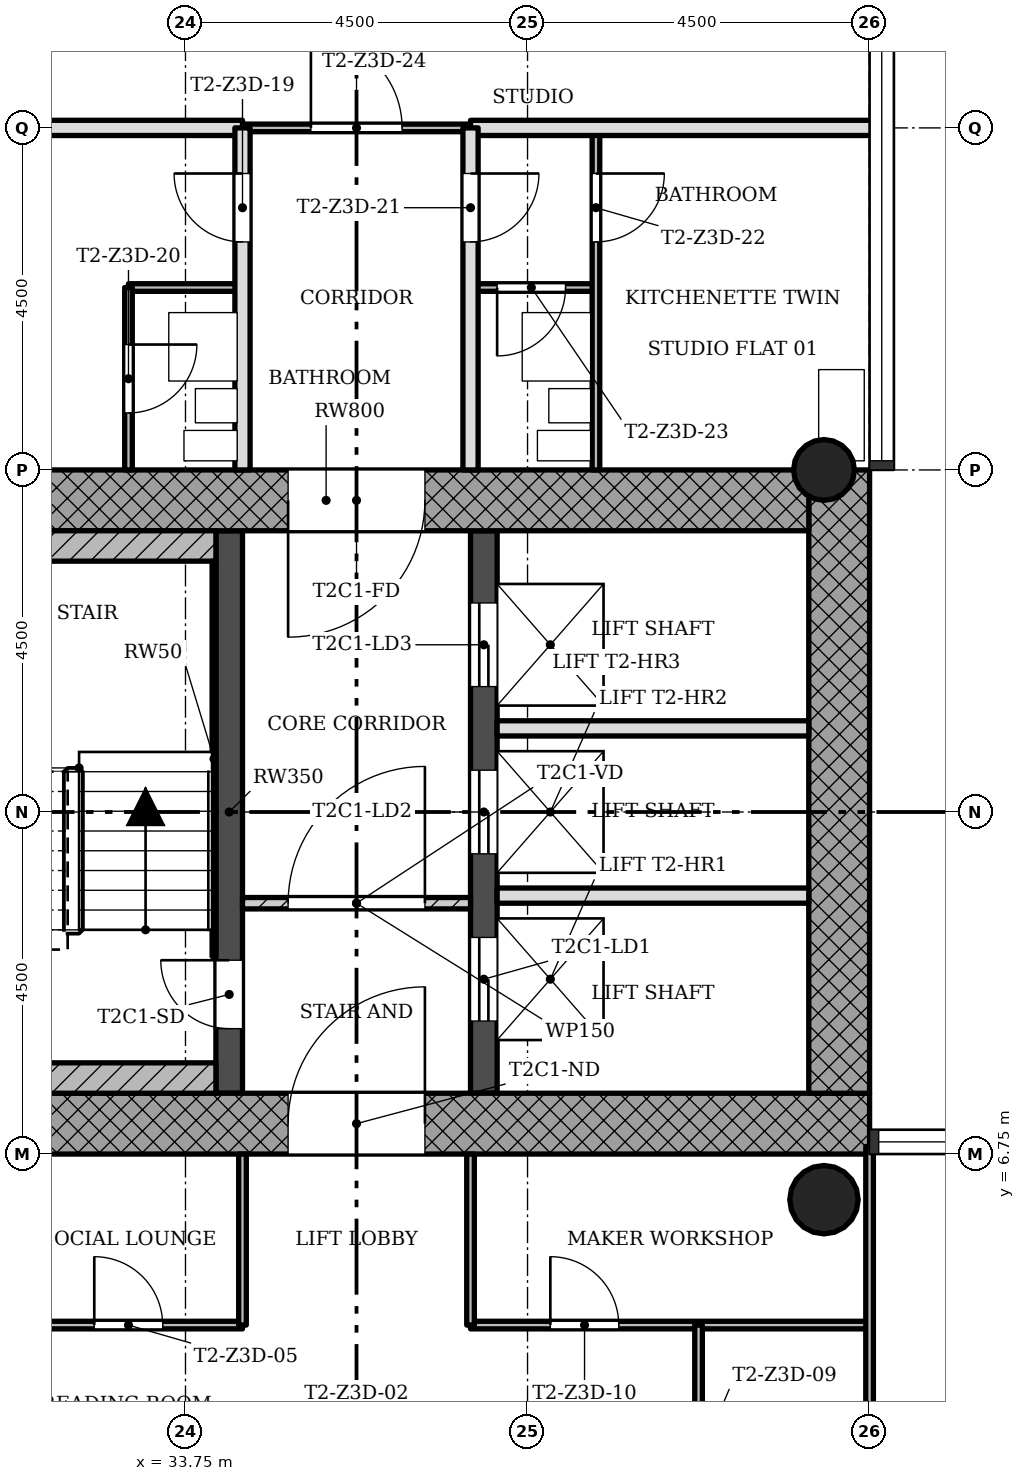
"""IFC4 building model, lengths in metres.
Left out: names, types, materials, properties, quantities, classifications, styles, units other than length and angle.
Written with IfcOpenShell. Run it as: python <this file> out.ifc"""

import sys

from ifc_helpers import new_model, si_unit, direction, frame, frame_2d, origin, origin_2d, place, context, subcontext, project, spatial, rectangle, hollow_circle, extrude, element, fill, save


model = new_model("IFC4")
c1 = context("Model", 3, precision=1e-05, world=origin(), true_north=direction((0.0, 1.0)))
c2 = subcontext(c1, "Body", "Model", "MODEL_VIEW")
j1 = project(units=[si_unit("LENGTHUNIT", "METRE"), si_unit("PLANEANGLEUNIT", "RADIAN")], contexts=[c1])
p1 = place(None, origin())
s1 = spatial("IfcSite", under=j1, at=p1, CompositionType="ELEMENT")
p2 = place(p1, origin())
s2 = spatial("IfcBuilding", under=s1, at=p2, CompositionType="ELEMENT")
p3 = place(p2, frame((0.0, 0.0, 174.5)))
s3 = spatial("IfcBuildingStorey", under=s2, at=p3, CompositionType="ELEMENT", Elevation=174.5)
p4 = place(p3, frame((30.05, 7.15, 0.0), z_axis=(0.0, 0.0, 1.0), x_axis=(1.0, 0.0, 0.0)))
e1 = element("IfcWall", 1, at=p4, inside=s3, PredefinedType="SHEAR", context=c2, shape_type="SweptSolid", body=[
    extrude(rectangle(XDim=12.7, YDim=0.8, at=frame_2d((6.35, 0.0))), origin(), (0.0, 0.0, 1.0), 3.4),
])
p5 = place(p4, frame((5.05, 0.0, 0.0)))
e2 = element("IfcOpeningElement", 2, at=p5, cuts=e1, PredefinedType="OPENING", context=c2, shape_type="SweptSolid", body=[
    extrude(rectangle(XDim=1.8, YDim=2.1, at=frame_2d((0.9, 1.05))), frame((0.0, 0.41, 0.0), z_axis=(0.0, -1.0, 0.0), x_axis=(1.0, 0.0, 0.0)), (0.0, 0.0, 1.0), 0.82),
])
p6 = place(p3, frame((42.35, 7.55, 0.0), z_axis=(0.0, 0.0, 1.0), x_axis=(0.0, 1.0, 0.0)))
e3 = element("IfcWall", 3, at=p6, inside=s3, PredefinedType="SHEAR", context=c2, shape_type="SweptSolid", body=[
    extrude(rectangle(XDim=8.2, YDim=0.8, at=frame_2d((4.1, 0.0))), origin(), (0.0, 0.0, 1.0), 3.4),
])
p7 = place(p3, frame((41.95, 15.35, 0.0), z_axis=(0.0, 0.0, 1.0), x_axis=(-1.0, 0.0, 0.0)))
e4 = element("IfcWall", 4, at=p7, inside=s3, PredefinedType="SHEAR", context=c2, shape_type="SweptSolid", body=[
    extrude(rectangle(XDim=12.7, YDim=0.8, at=frame_2d((6.35, 0.0))), origin(), (0.0, 0.0, 1.0), 3.4),
])
p8 = place(p7, frame((5.05, 0.0, 0.0)))
e5 = element("IfcOpeningElement", 5, at=p8, cuts=e4, PredefinedType="OPENING", context=c2, shape_type="SweptSolid", body=[
    extrude(rectangle(XDim=1.8, YDim=2.1, at=frame_2d((0.9, 1.05))), frame((0.0, 0.41, 0.0), z_axis=(0.0, -1.0, 0.0), x_axis=(1.0, 0.0, 0.0)), (0.0, 0.0, 1.0), 0.82),
])
p9 = place(p3, frame((34.325, 7.55, 0.0), z_axis=(0.0, 0.0, 1.0), x_axis=(0.0, 1.0, 0.0)))
e6 = element("IfcWall", 6, at=p9, inside=s3, PredefinedType="SHEAR", context=c2, shape_type="SweptSolid", body=[
    extrude(rectangle(XDim=7.4, YDim=0.35, at=frame_2d((3.7, 0.0))), origin(), (0.0, 0.0, 1.0), 3.4),
])
p10 = place(p9, frame((0.85, 0.0, 0.0)))
e7 = element("IfcOpeningElement", 7, at=p10, cuts=e6, PredefinedType="OPENING", context=c2, shape_type="SweptSolid", body=[
    extrude(rectangle(XDim=0.9, YDim=2.1, at=frame_2d((0.45, 1.05))), frame((0.0, 0.185, 0.0), z_axis=(0.0, -1.0, 0.0), x_axis=(1.0, 0.0, 0.0)), (0.0, 0.0, 1.0), 0.37),
])
p11 = place(p3, frame((37.675, 7.55, 0.0), z_axis=(0.0, 0.0, 1.0), x_axis=(0.0, 1.0, 0.0)))
e8 = element("IfcWall", 8, at=p11, inside=s3, PredefinedType="SHEAR", context=c2, shape_type="SweptSolid", body=[
    extrude(rectangle(XDim=7.4, YDim=0.35, at=frame_2d((3.7, 0.0))), origin(), (0.0, 0.0, 1.0), 3.4),
])
p12 = place(p11, frame((0.95, 0.0, 0.0)))
e9 = element("IfcOpeningElement", 9, at=p12, cuts=e8, PredefinedType="OPENING", context=c2, shape_type="SweptSolid", body=[
    extrude(rectangle(XDim=1.1, YDim=2.1, at=frame_2d((0.55, 1.05))), frame((0.0, 0.185, 0.0), z_axis=(0.0, -1.0, 0.0), x_axis=(1.0, 0.0, 0.0)), (0.0, 0.0, 1.0), 0.37),
])
p13 = place(p11, frame((3.15, 0.0, 0.0)))
e10 = element("IfcOpeningElement", 10, at=p13, cuts=e8, PredefinedType="OPENING", context=c2, shape_type="SweptSolid", body=[
    extrude(rectangle(XDim=1.1, YDim=2.1, at=frame_2d((0.55, 1.05))), frame((0.0, 0.185, 0.0), z_axis=(0.0, -1.0, 0.0), x_axis=(1.0, 0.0, 0.0)), (0.0, 0.0, 1.0), 0.37),
])
p14 = place(p11, frame((5.35, 0.0, 0.0)))
e11 = element("IfcOpeningElement", 11, at=p14, cuts=e8, PredefinedType="OPENING", context=c2, shape_type="SweptSolid", body=[
    extrude(rectangle(XDim=1.1, YDim=2.1, at=frame_2d((0.55, 1.05))), frame((0.0, 0.185, 0.0), z_axis=(0.0, -1.0, 0.0), x_axis=(1.0, 0.0, 0.0)), (0.0, 0.0, 1.0), 0.37),
])
p15 = place(p3, frame((42.15, 15.75, 0.0), z_axis=(0.0, 0.0, 1.0), x_axis=(1.0, 0.0, 0.0)))
e12 = element("IfcColumn", 12, at=p15, inside=s3, PredefinedType="COLUMN", context=c2, shape_type="SweptSolid", body=[
    extrude(hollow_circle(Radius=0.4, WallThickness=0.028, at=origin_2d()), origin(), (0.0, 0.0, 1.0), 3.4),
])
p16 = place(p3, frame((42.15, 6.15, 0.0), z_axis=(0.0, 0.0, 1.0), x_axis=(1.0, 0.0, 0.0)))
e13 = element("IfcColumn", 13, at=p16, inside=s3, PredefinedType="COLUMN", context=c2, shape_type="SweptSolid", body=[
    extrude(hollow_circle(Radius=0.45, WallThickness=0.032, at=origin_2d()), origin(), (0.0, 0.0, 1.0), 3.4),
])
p17 = place(p3, frame((37.5, 10.05, 0.0), z_axis=(0.0, 0.0, 1.0), x_axis=(-1.0, 0.0, 0.0)))
e14 = element("IfcWall", 14, at=p17, inside=s3, PredefinedType="PARTITIONING", context=c2, shape_type="SweptSolid", body=[
    extrude(rectangle(XDim=3.0, YDim=0.15, at=frame_2d((1.5, 0.0))), origin(), (0.0, 0.0, 1.0), 3.0),
])
p18 = place(p17, frame((0.6, 0.0, 0.0)))
e15 = element("IfcOpeningElement", 15, at=p18, cuts=e14, PredefinedType="OPENING", context=c2, shape_type="SweptSolid", body=[
    extrude(rectangle(XDim=1.8, YDim=2.1, at=frame_2d((0.9, 1.05))), frame((0.0, 0.085, 0.0), z_axis=(0.0, -1.0, 0.0), x_axis=(1.0, 0.0, 0.0)), (0.0, 0.0, 1.0), 0.17),
])
for number, where, z_axis, x_axis in (
    (16, (41.95, 10.15, 0.0), (0.0, 0.0, 1.0), (-1.0, 0.0, 0.0)),
    (17, (41.95, 12.35, 0.0), (0.0, 0.0, 1.0), (-1.0, 0.0, 0.0)),
):
    element("IfcWall", number, at=place(p3, frame(where, z_axis=z_axis, x_axis=x_axis)), inside=s3, PredefinedType="SOLIDWALL", context=c2, shape_type="SweptSolid", body=[
        extrude(rectangle(XDim=4.1, YDim=0.2, at=frame_2d((2.05, 0.0))), origin(), (0.0, 0.0, 1.0), 3.0),
    ])
p19 = place(p3, frame((42.75, 4.5, 0.0), z_axis=(0.0, 0.0, 1.0), x_axis=(-1.0, 0.0, 0.0)))
e18 = element("IfcWall", 18, at=p19, inside=s3, PredefinedType="PARTITIONING", context=c2, shape_type="SweptSolid", body=[
    extrude(rectangle(XDim=5.25, YDim=0.1, at=frame_2d((2.625, 0.0))), origin(), (0.0, 0.0, 1.0), 3.0),
])
p20 = place(p19, frame((3.3, 0.0, 0.0)))
e19 = element("IfcOpeningElement", 19, at=p20, cuts=e18, PredefinedType="OPENING", context=c2, shape_type="SweptSolid", body=[
    extrude(rectangle(XDim=0.9, YDim=2.1, at=frame_2d((0.45, 1.05))), frame((0.0, 0.06, 0.0), z_axis=(0.0, -1.0, 0.0), x_axis=(1.0, 0.0, 0.0)), (0.0, 0.0, 1.0), 0.12),
])
p21 = place(p3, frame((34.5, 4.5, 0.0), z_axis=(0.0, 0.0, 1.0), x_axis=(-1.0, 0.0, 0.0)))
e20 = element("IfcWall", 20, at=p21, inside=s3, PredefinedType="PARTITIONING", context=c2, shape_type="SweptSolid", body=[
    extrude(rectangle(XDim=3.0, YDim=0.1, at=frame_2d((1.5, 0.0))), origin(), (0.0, 0.0, 1.0), 3.0),
])
p22 = place(p21, frame((1.05, 0.0, 0.0)))
e21 = element("IfcOpeningElement", 21, at=p22, cuts=e20, PredefinedType="OPENING", context=c2, shape_type="SweptSolid", body=[
    extrude(rectangle(XDim=0.9, YDim=2.1, at=frame_2d((0.45, 1.05))), frame((0.0, 0.06, 0.0), z_axis=(0.0, -1.0, 0.0), x_axis=(1.0, 0.0, 0.0)), (0.0, 0.0, 1.0), 0.12),
])
p23 = place(p3, frame((39.15, 18.15, 0.0), z_axis=(0.0, 0.0, 1.0), x_axis=(-1.0, 0.0, 0.0)))
e22 = element("IfcWall", 22, at=p23, inside=s3, PredefinedType="PARTITIONING", context=c2, shape_type="SweptSolid", body=[
    extrude(rectangle(XDim=1.65, YDim=0.1, at=frame_2d((0.825, 0.0))), origin(), (0.0, 0.0, 1.0), 3.0),
])
p24 = place(p23, frame((0.4, 0.0, 0.0)))
e23 = element("IfcOpeningElement", 23, at=p24, cuts=e22, PredefinedType="OPENING", context=c2, shape_type="SweptSolid", body=[
    extrude(rectangle(XDim=0.9, YDim=2.1, at=frame_2d((0.45, 1.05))), frame((0.0, 0.06, 0.0), z_axis=(0.0, -1.0, 0.0), x_axis=(1.0, 0.0, 0.0)), (0.0, 0.0, 1.0), 0.12),
])
p25 = place(p3, frame((34.5, 18.15, 0.0), z_axis=(0.0, 0.0, 1.0), x_axis=(-1.0, 0.0, 0.0)))
e24 = element("IfcWall", 24, at=p25, inside=s3, PredefinedType="PARTITIONING", context=c2, shape_type="SweptSolid", body=[
    extrude(rectangle(XDim=1.5, YDim=0.1, at=frame_2d((0.75, 0.0))), origin(), (0.0, 0.0, 1.0), 3.0),
])
p26 = place(p3, frame((37.5, 20.25, 0.0), z_axis=(0.0, 0.0, 1.0), x_axis=(-1.0, 0.0, 0.0)))
e25 = element("IfcWall", 25, at=p26, inside=s3, PredefinedType="PARTITIONING", context=c2, shape_type="SweptSolid", body=[
    extrude(rectangle(XDim=3.0, YDim=0.1, at=frame_2d((1.5, 0.0))), origin(), (0.0, 0.0, 1.0), 3.0),
])
p27 = place(p26, frame((0.9, 0.0, 0.0)))
e26 = element("IfcOpeningElement", 26, at=p27, cuts=e25, PredefinedType="OPENING", context=c2, shape_type="SweptSolid", body=[
    extrude(rectangle(XDim=1.2, YDim=2.1, at=frame_2d((0.6, 1.05))), frame((0.0, 0.06, 0.0), z_axis=(0.0, -1.0, 0.0), x_axis=(1.0, 0.0, 0.0)), (0.0, 0.0, 1.0), 0.12),
])
for number, where, z_axis, x_axis in (
    (27, (42.85, 20.25, 0.0), (0.0, 0.0, 1.0), (-1.0, 0.0, 0.0)),
    (28, (34.5, 20.25, 0.0), (0.0, 0.0, 1.0), (-1.0, 0.0, 0.0)),
):
    element("IfcWall", number, at=place(p3, frame(where, z_axis=z_axis, x_axis=x_axis)), inside=s3, PredefinedType="SOLIDWALL", context=c2, shape_type="SweptSolid", body=[
        extrude(rectangle(XDim=5.35, YDim=0.2, at=frame_2d((2.675, 0.0))), origin(), (0.0, 0.0, 1.0), 3.0),
    ])
p28 = place(p3, frame((42.75, 0.9, 0.0), z_axis=(0.0, 0.0, 1.0), x_axis=(0.0, 1.0, 0.0)))
e29 = element("IfcWall", 29, at=p28, inside=s3, PredefinedType="PARTITIONING", context=c2, shape_type="SweptSolid", body=[
    extrude(rectangle(XDim=5.95, YDim=0.1, at=frame_2d((2.975, 0.0))), origin(), (0.0, 0.0, 1.0), 3.0),
])
p29 = place(p3, frame((40.5, 0.9, 0.0), z_axis=(0.0, 0.0, 1.0), x_axis=(0.0, 1.0, 0.0)))
e30 = element("IfcWall", 30, at=p29, inside=s3, PredefinedType="PARTITIONING", context=c2, shape_type="SweptSolid", body=[
    extrude(rectangle(XDim=3.6, YDim=0.1, at=frame_2d((1.8, 0.0))), origin(), (0.0, 0.0, 1.0), 3.0),
])
p30 = place(p29, frame((1.35, 0.0, 0.0)))
e31 = element("IfcOpeningElement", 31, at=p30, cuts=e30, PredefinedType="OPENING", context=c2, shape_type="SweptSolid", body=[
    extrude(rectangle(XDim=0.9, YDim=2.1, at=frame_2d((0.45, 1.05))), frame((0.0, 0.06, 0.0), z_axis=(0.0, -1.0, 0.0), x_axis=(1.0, 0.0, 0.0)), (0.0, 0.0, 1.0), 0.12),
])
p31 = place(p3, frame((39.15, 15.75, 0.0), z_axis=(0.0, 0.0, 1.0), x_axis=(0.0, 1.0, 0.0)))
e32 = element("IfcWall", 32, at=p31, inside=s3, PredefinedType="PARTITIONING", context=c2, shape_type="SweptSolid", body=[
    extrude(rectangle(XDim=4.5, YDim=0.1, at=frame_2d((2.25, 0.0))), origin(), (0.0, 0.0, 1.0), 3.0),
])
p32 = place(p31, frame((3.0, 0.0, 0.0)))
e33 = element("IfcOpeningElement", 33, at=p32, cuts=e32, PredefinedType="OPENING", context=c2, shape_type="SweptSolid", body=[
    extrude(rectangle(XDim=0.9, YDim=2.1, at=frame_2d((0.45, 1.05))), frame((0.0, 0.06, 0.0), z_axis=(0.0, -1.0, 0.0), x_axis=(1.0, 0.0, 0.0)), (0.0, 0.0, 1.0), 0.12),
])
p33 = place(p3, frame((37.5, 4.5, 0.0), z_axis=(0.0, 0.0, 1.0), x_axis=(0.0, 1.0, 0.0)))
e34 = element("IfcWall", 34, at=p33, inside=s3, PredefinedType="PARTITIONING", context=c2, shape_type="SweptSolid", body=[
    extrude(rectangle(XDim=2.25, YDim=0.1, at=frame_2d((1.125, 0.0))), origin(), (0.0, 0.0, 1.0), 3.0),
])
p34 = place(p3, frame((37.5, 15.75, 0.0), z_axis=(0.0, 0.0, 1.0), x_axis=(0.0, 1.0, 0.0)))
e35 = element("IfcWall", 35, at=p34, inside=s3, PredefinedType="SOLIDWALL", context=c2, shape_type="SweptSolid", body=[
    extrude(rectangle(XDim=4.5, YDim=0.2, at=frame_2d((2.25, 0.0))), origin(), (0.0, 0.0, 1.0), 3.0),
])
p35 = place(p34, frame((3.0, 0.0, 0.0)))
e36 = element("IfcOpeningElement", 36, at=p35, cuts=e35, PredefinedType="OPENING", context=c2, shape_type="SweptSolid", body=[
    extrude(rectangle(XDim=0.9, YDim=2.1, at=frame_2d((0.45, 1.05))), frame((0.0, 0.11, 0.0), z_axis=(0.0, -1.0, 0.0), x_axis=(1.0, 0.0, 0.0)), (0.0, 0.0, 1.0), 0.22),
])
p36 = place(p3, frame((34.5, 4.5, 0.0), z_axis=(0.0, 0.0, 1.0), x_axis=(0.0, 1.0, 0.0)))
e37 = element("IfcWall", 37, at=p36, inside=s3, PredefinedType="PARTITIONING", context=c2, shape_type="SweptSolid", body=[
    extrude(rectangle(XDim=2.25, YDim=0.1, at=frame_2d((1.125, 0.0))), origin(), (0.0, 0.0, 1.0), 3.0),
])
p37 = place(p3, frame((34.5, 15.75, 0.0), z_axis=(0.0, 0.0, 1.0), x_axis=(0.0, 1.0, 0.0)))
e38 = element("IfcWall", 38, at=p37, inside=s3, PredefinedType="SOLIDWALL", context=c2, shape_type="SweptSolid", body=[
    extrude(rectangle(XDim=4.5, YDim=0.2, at=frame_2d((2.25, 0.0))), origin(), (0.0, 0.0, 1.0), 3.0),
])
p38 = place(p37, frame((3.0, 0.0, 0.0)))
e39 = element("IfcOpeningElement", 39, at=p38, cuts=e38, PredefinedType="OPENING", context=c2, shape_type="SweptSolid", body=[
    extrude(rectangle(XDim=0.9, YDim=2.1, at=frame_2d((0.45, 1.05))), frame((0.0, 0.11, 0.0), z_axis=(0.0, -1.0, 0.0), x_axis=(1.0, 0.0, 0.0)), (0.0, 0.0, 1.0), 0.22),
])
p39 = place(p3, frame((33.0, 15.75, 0.0), z_axis=(0.0, 0.0, 1.0), x_axis=(0.0, 1.0, 0.0)))
e40 = element("IfcWall", 40, at=p39, inside=s3, PredefinedType="PARTITIONING", context=c2, shape_type="SweptSolid", body=[
    extrude(rectangle(XDim=2.4, YDim=0.1, at=frame_2d((1.2, 0.0))), origin(), (0.0, 0.0, 1.0), 3.0),
])
p40 = place(p39, frame((0.75, 0.0, 0.0)))
e41 = element("IfcOpeningElement", 41, at=p40, cuts=e40, PredefinedType="OPENING", context=c2, shape_type="SweptSolid", body=[
    extrude(rectangle(XDim=0.9, YDim=2.1, at=frame_2d((0.45, 1.05))), frame((0.0, 0.06, 0.0), z_axis=(0.0, -1.0, 0.0), x_axis=(1.0, 0.0, 0.0)), (0.0, 0.0, 1.0), 0.12),
])
for number, where, z_axis, x_axis in (
    (42, (34.15, 14.75, 0.0), (0.0, 0.0, 1.0), (-1.0, 0.0, 0.0)),
    (43, (34.15, 7.75, 0.0), (0.0, 0.0, 1.0), (-1.0, 0.0, 0.0)),
):
    element("IfcWall", number, at=place(p3, frame(where, z_axis=z_axis, x_axis=x_axis)), inside=s3, PredefinedType="SHEAR", context=c2, shape_type="SweptSolid", body=[
        extrude(rectangle(XDim=4.1, YDim=0.4, at=frame_2d((2.05, 0.0))), origin(), (0.0, 0.0, 1.0), 3.4),
    ])
p41 = place(p3, frame((34.125, 9.35, 0.0), z_axis=(0.0, 0.0, 1.0), x_axis=(0.0, 1.0, 0.0)))
e44 = element("IfcWall", 44, at=p41, inside=s3, PredefinedType="SHEAR", context=c2, shape_type="SweptSolid", body=[
    extrude(rectangle(XDim=5.2, YDim=0.05, at=frame_2d((2.6, 0.0))), origin(), (0.0, 0.0, 1.0), 3.4),
])
p42 = place(p18, origin())
e45 = element("IfcDoor", 45, at=p42, inside=s3, OperationType="SINGLE_SWING_LEFT", PredefinedType="DOOR", context=c2, shape_type="SweptSolid", body=[
    extrude(rectangle(XDim=1.8, YDim=2.1, at=frame_2d((0.9, 1.05))), frame((0.0, 0.025, 0.0), z_axis=(0.0, -1.0, 0.0), x_axis=(1.0, 0.0, 0.0)), (0.0, 0.0, 1.0), 0.05),
])
fill(e15, e45)
p43 = place(p22, origin())
e46 = element("IfcDoor", 46, at=p43, inside=s3, OperationType="SINGLE_SWING_RIGHT", PredefinedType="DOOR", context=c2, shape_type="SweptSolid", body=[
    extrude(rectangle(XDim=0.9, YDim=2.1, at=frame_2d((0.45, 1.05))), frame((0.0, 0.025, 0.0), z_axis=(0.0, -1.0, 0.0), x_axis=(1.0, 0.0, 0.0)), (0.0, 0.0, 1.0), 0.05),
])
fill(e21, e46)
p44 = place(p20, origin())
e47 = element("IfcDoor", 47, at=p44, inside=s3, OperationType="SINGLE_SWING_RIGHT", PredefinedType="DOOR", context=c2, shape_type="SweptSolid", body=[
    extrude(rectangle(XDim=0.9, YDim=2.1, at=frame_2d((0.45, 1.05))), frame((0.0, 0.025, 0.0), z_axis=(0.0, -1.0, 0.0), x_axis=(1.0, 0.0, 0.0)), (0.0, 0.0, 1.0), 0.05),
])
fill(e19, e47)
p45 = place(p38, origin())
e48 = element("IfcDoor", 48, at=p45, inside=s3, OperationType="SINGLE_SWING_LEFT", PredefinedType="DOOR", context=c2, shape_type="SweptSolid", body=[
    extrude(rectangle(XDim=0.9, YDim=2.1, at=frame_2d((0.45, 1.05))), frame((0.0, 0.025, 0.0), z_axis=(0.0, -1.0, 0.0), x_axis=(1.0, 0.0, 0.0)), (0.0, 0.0, 1.0), 0.05),
])
fill(e39, e48)
p46 = place(p40, origin())
e49 = element("IfcDoor", 49, at=p46, inside=s3, OperationType="SINGLE_SWING_RIGHT", PredefinedType="DOOR", context=c2, shape_type="SweptSolid", body=[
    extrude(rectangle(XDim=0.9, YDim=2.1, at=frame_2d((0.45, 1.05))), frame((0.0, 0.025, 0.0), z_axis=(0.0, -1.0, 0.0), x_axis=(1.0, 0.0, 0.0)), (0.0, 0.0, 1.0), 0.05),
])
fill(e41, e49)
p47 = place(p35, origin())
e50 = element("IfcDoor", 50, at=p47, inside=s3, OperationType="SINGLE_SWING_RIGHT", PredefinedType="DOOR", context=c2, shape_type="SweptSolid", body=[
    extrude(rectangle(XDim=0.9, YDim=2.1, at=frame_2d((0.45, 1.05))), frame((0.0, 0.025, 0.0), z_axis=(0.0, -1.0, 0.0), x_axis=(1.0, 0.0, 0.0)), (0.0, 0.0, 1.0), 0.05),
])
fill(e36, e50)
p48 = place(p32, origin())
e51 = element("IfcDoor", 51, at=p48, inside=s3, OperationType="SINGLE_SWING_RIGHT", PredefinedType="DOOR", context=c2, shape_type="SweptSolid", body=[
    extrude(rectangle(XDim=0.9, YDim=2.1, at=frame_2d((0.45, 1.05))), frame((0.0, 0.025, 0.0), z_axis=(0.0, -1.0, 0.0), x_axis=(1.0, 0.0, 0.0)), (0.0, 0.0, 1.0), 0.05),
])
fill(e33, e51)
p49 = place(p24, origin())
e52 = element("IfcDoor", 52, at=p49, inside=s3, OperationType="SINGLE_SWING_LEFT", PredefinedType="DOOR", context=c2, shape_type="SweptSolid", body=[
    extrude(rectangle(XDim=0.9, YDim=2.1, at=frame_2d((0.45, 1.05))), frame((0.0, 0.025, 0.0), z_axis=(0.0, -1.0, 0.0), x_axis=(1.0, 0.0, 0.0)), (0.0, 0.0, 1.0), 0.05),
])
fill(e23, e52)
p50 = place(p27, origin())
e53 = element("IfcDoor", 53, at=p50, inside=s3, OperationType="SINGLE_SWING_RIGHT", PredefinedType="DOOR", context=c2, shape_type="SweptSolid", body=[
    extrude(rectangle(XDim=1.2, YDim=2.1, at=frame_2d((0.6, 1.05))), frame((0.0, 0.025, 0.0), z_axis=(0.0, -1.0, 0.0), x_axis=(1.0, 0.0, 0.0)), (0.0, 0.0, 1.0), 0.05),
])
fill(e26, e53)
p51 = place(p10, origin())
e54 = element("IfcDoor", 54, at=p51, inside=s3, OperationType="SINGLE_SWING_LEFT", PredefinedType="DOOR", context=c2, shape_type="SweptSolid", body=[
    extrude(rectangle(XDim=0.9, YDim=2.1, at=frame_2d((0.45, 1.05))), frame((0.0, 0.025, 0.0), z_axis=(0.0, -1.0, 0.0), x_axis=(1.0, 0.0, 0.0)), (0.0, 0.0, 1.0), 0.05),
])
fill(e7, e54)
p52 = place(p12, origin())
e55 = element("IfcDoor", 55, at=p52, inside=s3, OperationType="SLIDING_TO_LEFT", PredefinedType="DOOR", context=c2, shape_type="SweptSolid", body=[
    extrude(rectangle(XDim=1.1, YDim=2.1, at=frame_2d((0.55, 1.05))), frame((0.0, 0.025, 0.0), z_axis=(0.0, -1.0, 0.0), x_axis=(1.0, 0.0, 0.0)), (0.0, 0.0, 1.0), 0.05),
])
fill(e9, e55)
p53 = place(p13, origin())
e56 = element("IfcDoor", 56, at=p53, inside=s3, OperationType="SLIDING_TO_LEFT", PredefinedType="DOOR", context=c2, shape_type="SweptSolid", body=[
    extrude(rectangle(XDim=1.1, YDim=2.1, at=frame_2d((0.55, 1.05))), frame((0.0, 0.025, 0.0), z_axis=(0.0, -1.0, 0.0), x_axis=(1.0, 0.0, 0.0)), (0.0, 0.0, 1.0), 0.05),
])
fill(e10, e56)
p54 = place(p14, origin())
e57 = element("IfcDoor", 57, at=p54, inside=s3, OperationType="SLIDING_TO_LEFT", PredefinedType="DOOR", context=c2, shape_type="SweptSolid", body=[
    extrude(rectangle(XDim=1.1, YDim=2.1, at=frame_2d((0.55, 1.05))), frame((0.0, 0.025, 0.0), z_axis=(0.0, -1.0, 0.0), x_axis=(1.0, 0.0, 0.0)), (0.0, 0.0, 1.0), 0.05),
])
fill(e11, e57)
p55 = place(p5, origin())
e58 = element("IfcDoor", 58, at=p55, inside=s3, OperationType="SINGLE_SWING_LEFT", PredefinedType="DOOR", context=c2, shape_type="SweptSolid", body=[
    extrude(rectangle(XDim=1.8, YDim=2.1, at=frame_2d((0.9, 1.05))), frame((0.0, 0.025, 0.0), z_axis=(0.0, -1.0, 0.0), x_axis=(1.0, 0.0, 0.0)), (0.0, 0.0, 1.0), 0.05),
])
fill(e2, e58)
p56 = place(p8, origin())
e59 = element("IfcDoor", 59, at=p56, inside=s3, OperationType="SINGLE_SWING_LEFT", PredefinedType="DOOR", context=c2, shape_type="SweptSolid", body=[
    extrude(rectangle(XDim=1.8, YDim=2.1, at=frame_2d((0.9, 1.05))), frame((0.0, 0.025, 0.0), z_axis=(0.0, -1.0, 0.0), x_axis=(1.0, 0.0, 0.0)), (0.0, 0.0, 1.0), 0.05),
])
fill(e5, e59)
save(model, sys.argv[1])
